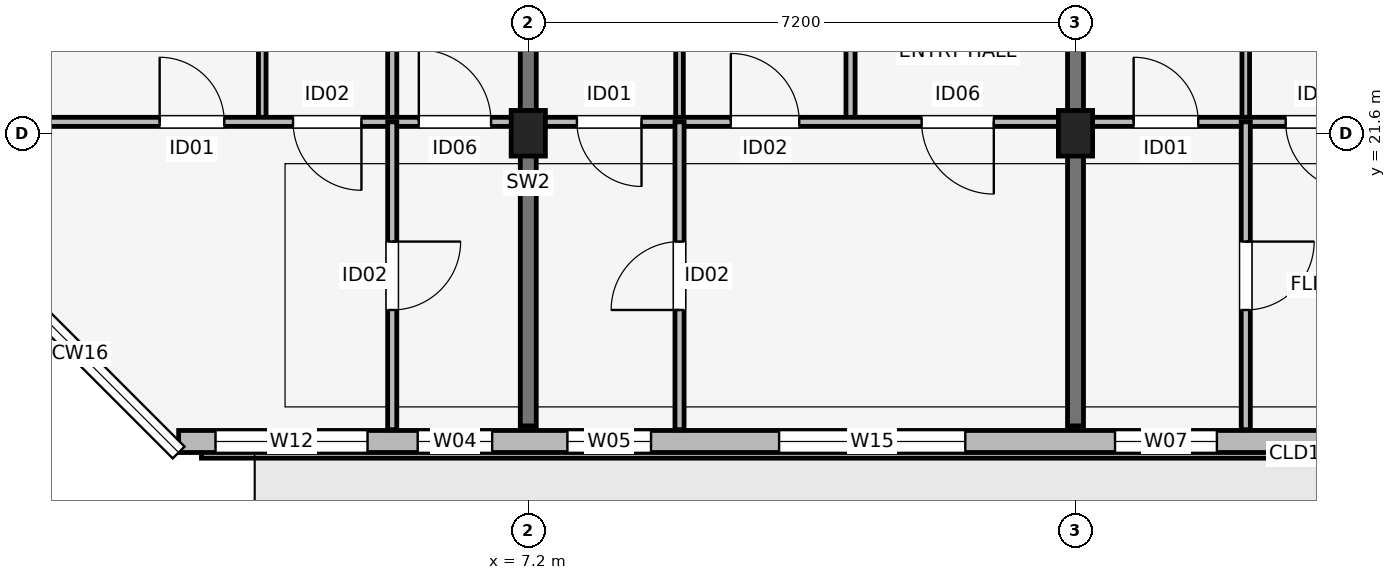
"""IFC4 building model, lengths in metres.
Left out: names, types, materials, properties, quantities, classifications, styles, units other than length and angle.
Written with IfcOpenShell. Run it as: python <this file> out.ifc"""

import sys

from ifc_helpers import new_model, si_unit, direction, frame, frame_2d, origin, origin_2d, place, context, subcontext, project, spatial, rectangle, extrude, element, fill, save


model = new_model("IFC4")
c1 = context("Model", 3, precision=1e-05, world=origin(), true_north=direction((0.0, 1.0)))
c2 = subcontext(c1, "Body", "Model", "MODEL_VIEW")
j1 = project(units=[si_unit("LENGTHUNIT", "METRE"), si_unit("PLANEANGLEUNIT", "RADIAN")], contexts=[c1])
p1 = place(None, origin())
s1 = spatial("IfcSite", under=j1, at=p1, CompositionType="ELEMENT")
p2 = place(p1, origin())
s2 = spatial("IfcBuilding", under=s1, at=p2, CompositionType="ELEMENT")
p3 = place(p2, frame((0.0, 0.0, 27.6)))
s3 = spatial("IfcBuildingStorey", under=s2, at=p3, CompositionType="ELEMENT", Elevation=27.6)
for number, where, z_axis, x_axis in (
    (1, (7.2, 21.6, 0.0), (0.0, 0.0, 1.0), (1.0, 0.0, 0.0)),
    (2, (14.4, 21.6, 0.0), (0.0, 0.0, 1.0), (1.0, 0.0, 0.0)),
):
    element("IfcColumn", number, at=place(p3, frame(where, z_axis=z_axis, x_axis=x_axis)), inside=s3, PredefinedType="COLUMN", context=c2, shape_type="SweptSolid", body=[
        extrude(rectangle(XDim=0.45, YDim=0.6, at=origin_2d()), origin(), (0.0, 0.0, 1.0), 3.15),
    ])
for number, where, z_axis, x_axis in (
    (3, (7.2, 17.75, 0.0), (0.0, 0.0, 1.0), (0.0, 1.0, 0.0)),
    (4, (14.4, 17.75, 0.0), (0.0, 0.0, 1.0), (0.0, 1.0, 0.0)),
):
    element("IfcWall", number, at=place(p3, frame(where, z_axis=z_axis, x_axis=x_axis)), inside=s3, PredefinedType="SHEAR", context=c2, shape_type="SweptSolid", body=[
        extrude(rectangle(XDim=6.4, YDim=0.21, at=frame_2d((3.2, 0.0))), origin(), (0.0, 0.0, 1.0), 3.15),
    ])
p4 = place(p3, frame((2.6, 17.545, 0.0), z_axis=(0.0, 0.0, 1.0), x_axis=(1.0, 0.0, 0.0)))
e5 = element("IfcWall", 5, at=p4, inside=s3, PredefinedType="SOLIDWALL", context=c2, shape_type="SweptSolid", body=[
    extrude(rectangle(XDim=30.8, YDim=0.29, at=frame_2d((15.4, 0.0))), origin(), (0.0, 0.0, 1.0), 2.43),
])
p5 = place(p4, frame((17.95, 0.0, 0.0), z_axis=(0.0, 0.0, 1.0), x_axis=(-1.0, 0.0, 0.0)))
e6 = element("IfcOpeningElement", 6, at=p5, cuts=e5, PredefinedType="OPENING", context=c2, shape_type="SweptSolid", body=[
    extrude(rectangle(XDim=1.9, YDim=2.2, at=frame_2d((0.95, 1.1))), frame((0.0, 0.155, 0.0), z_axis=(0.0, -1.0, 0.0), x_axis=(1.0, 0.0, 0.0)), (0.0, 0.0, 1.0), 0.31),
])
p6 = place(p4, frame((0.485, 0.0, 0.67)))
e7 = element("IfcOpeningElement", 7, at=p6, cuts=e5, PredefinedType="OPENING", context=c2, shape_type="SweptSolid", body=[
    extrude(rectangle(XDim=2.0, YDim=1.65, at=frame_2d((1.0, 0.825))), frame((0.0, 0.155, 0.0), z_axis=(0.0, -1.0, 0.0), x_axis=(1.0, 0.0, 0.0)), (0.0, 0.0, 1.0), 0.31),
])
p7 = place(p4, frame((3.145, 0.0, 0.75)))
e8 = element("IfcOpeningElement", 8, at=p7, cuts=e5, PredefinedType="OPENING", context=c2, shape_type="SweptSolid", body=[
    extrude(rectangle(XDim=0.98, YDim=1.45, at=frame_2d((0.49, 0.725))), frame((0.0, 0.155, 0.0), z_axis=(0.0, -1.0, 0.0), x_axis=(1.0, 0.0, 0.0)), (0.0, 0.0, 1.0), 0.31),
])
p8 = place(p4, frame((5.115, 0.0, 0.75)))
e9 = element("IfcOpeningElement", 9, at=p8, cuts=e5, PredefinedType="OPENING", context=c2, shape_type="SweptSolid", body=[
    extrude(rectangle(XDim=1.1, YDim=1.5, at=frame_2d((0.55, 0.75))), frame((0.0, 0.155, 0.0), z_axis=(0.0, -1.0, 0.0), x_axis=(1.0, 0.0, 0.0)), (0.0, 0.0, 1.0), 0.31),
])
p9 = place(p4, frame((7.9, 0.0, 0.67)))
e10 = element("IfcOpeningElement", 10, at=p9, cuts=e5, PredefinedType="OPENING", context=c2, shape_type="SweptSolid", body=[
    extrude(rectangle(XDim=2.45, YDim=1.65, at=frame_2d((1.225, 0.825))), frame((0.0, 0.155, 0.0), z_axis=(0.0, -1.0, 0.0), x_axis=(1.0, 0.0, 0.0)), (0.0, 0.0, 1.0), 0.31),
])
p10 = place(p4, frame((12.32, 0.0, 0.75)))
e11 = element("IfcOpeningElement", 11, at=p10, cuts=e5, PredefinedType="OPENING", context=c2, shape_type="SweptSolid", body=[
    extrude(rectangle(XDim=1.34, YDim=1.55, at=frame_2d((0.67, 0.775))), frame((0.0, 0.155, 0.0), z_axis=(0.0, -1.0, 0.0), x_axis=(1.0, 0.0, 0.0)), (0.0, 0.0, 1.0), 0.31),
])
p11 = place(p4, frame((19.46, 0.0, 0.75)))
e12 = element("IfcOpeningElement", 12, at=p11, cuts=e5, PredefinedType="OPENING", context=c2, shape_type="SweptSolid", body=[
    extrude(rectangle(XDim=1.46, YDim=1.55, at=frame_2d((0.73, 0.775))), frame((0.0, 0.155, 0.0), z_axis=(0.0, -1.0, 0.0), x_axis=(1.0, 0.0, 0.0)), (0.0, 0.0, 1.0), 0.31),
])
p12 = place(p4, frame((22.72, 0.0, 0.7)))
e13 = element("IfcOpeningElement", 13, at=p12, cuts=e5, PredefinedType="OPENING", context=c2, shape_type="SweptSolid", body=[
    extrude(rectangle(XDim=1.86, YDim=1.6, at=frame_2d((0.93, 0.8))), frame((0.0, 0.155, 0.0), z_axis=(0.0, -1.0, 0.0), x_axis=(1.0, 0.0, 0.0)), (0.0, 0.0, 1.0), 0.31),
])
p13 = place(p4, frame((27.49, 0.0, 0.67)))
e14 = element("IfcOpeningElement", 14, at=p13, cuts=e5, PredefinedType="OPENING", context=c2, shape_type="SweptSolid", body=[
    extrude(rectangle(XDim=2.0, YDim=1.65, at=frame_2d((1.0, 0.825))), frame((0.0, 0.155, 0.0), z_axis=(0.0, -1.0, 0.0), x_axis=(1.0, 0.0, 0.0)), (0.0, 0.0, 1.0), 0.31),
])
p14 = place(p3, frame((3.7, 21.75, 0.0), z_axis=(0.0, 0.0, 1.0), x_axis=(0.0, 1.0, 0.0)))
e15 = element("IfcWall", 15, at=p14, inside=s3, PredefinedType="PARTITIONING", context=c2, shape_type="SweptSolid", body=[
    extrude(rectangle(XDim=2.55, YDim=0.1, at=frame_2d((1.275, 0.0))), origin(), (0.0, 0.0, 1.0), 2.38),
])
p15 = place(p3, frame((5.41, 21.75, 0.0), z_axis=(0.0, 0.0, 1.0), x_axis=(0.0, 1.0, 0.0)))
e16 = element("IfcWall", 16, at=p15, inside=s3, PredefinedType="PARTITIONING", context=c2, shape_type="SweptSolid", body=[
    extrude(rectangle(XDim=2.55, YDim=0.12, at=frame_2d((1.275, 0.0))), origin(), (0.0, 0.0, 1.0), 2.38),
])
p16 = place(p3, frame((0.14, 21.75, 0.0), z_axis=(0.0, 0.0, 1.0), x_axis=(1.0, 0.0, 0.0)))
e17 = element("IfcWall", 17, at=p16, inside=s3, PredefinedType="PARTITIONING", context=c2, shape_type="SweptSolid", body=[
    extrude(rectangle(XDim=6.92, YDim=0.12, at=frame_2d((3.46, 0.0))), origin(), (0.0, 0.0, 1.0), 2.38),
])
p17 = place(p16, frame((2.21, 0.0, 0.0)))
e18 = element("IfcOpeningElement", 18, at=p17, cuts=e17, PredefinedType="OPENING", context=c2, shape_type="SweptSolid", body=[
    extrude(rectangle(XDim=0.85, YDim=2.08, at=frame_2d((0.425, 1.04))), frame((0.0, 0.07, 0.0), z_axis=(0.0, -1.0, 0.0), x_axis=(1.0, 0.0, 0.0)), (0.0, 0.0, 1.0), 0.14),
])
p18 = place(p16, frame((4.865, 0.0, 0.0), z_axis=(0.0, 0.0, 1.0), x_axis=(-1.0, 0.0, 0.0)))
e19 = element("IfcOpeningElement", 19, at=p18, cuts=e17, PredefinedType="OPENING", context=c2, shape_type="SweptSolid", body=[
    extrude(rectangle(XDim=0.9, YDim=2.08, at=frame_2d((0.45, 1.04))), frame((0.0, 0.07, 0.0), z_axis=(0.0, -1.0, 0.0), x_axis=(1.0, 0.0, 0.0)), (0.0, 0.0, 1.0), 0.14),
])
p19 = place(p16, frame((5.62, 0.0, 0.0)))
e20 = element("IfcOpeningElement", 20, at=p19, cuts=e17, PredefinedType="OPENING", context=c2, shape_type="SweptSolid", body=[
    extrude(rectangle(XDim=0.95, YDim=2.08, at=frame_2d((0.475, 1.04))), frame((0.0, 0.07, 0.0), z_axis=(0.0, -1.0, 0.0), x_axis=(1.0, 0.0, 0.0)), (0.0, 0.0, 1.0), 0.14),
])
p20 = place(p3, frame((5.41, 17.7, 0.0), z_axis=(0.0, 0.0, 1.0), x_axis=(0.0, 1.0, 0.0)))
e21 = element("IfcWall", 21, at=p20, inside=s3, PredefinedType="PARTITIONING", context=c2, shape_type="SweptSolid", body=[
    extrude(rectangle(XDim=4.05, YDim=0.12, at=frame_2d((2.025, 0.0))), origin(), (0.0, 0.0, 1.0), 2.38),
])
p21 = place(p20, frame((2.475, 0.0, 0.0), z_axis=(0.0, 0.0, 1.0), x_axis=(-1.0, 0.0, 0.0)))
e22 = element("IfcOpeningElement", 22, at=p21, cuts=e21, PredefinedType="OPENING", context=c2, shape_type="SweptSolid", body=[
    extrude(rectangle(XDim=0.9, YDim=2.08, at=frame_2d((0.45, 1.04))), frame((0.0, 0.07, 0.0), z_axis=(0.0, -1.0, 0.0), x_axis=(1.0, 0.0, 0.0)), (0.0, 0.0, 1.0), 0.14),
])
p22 = place(p3, frame((9.19, 21.75, 0.0), z_axis=(0.0, 0.0, 1.0), x_axis=(0.0, 1.0, 0.0)))
e23 = element("IfcWall", 23, at=p22, inside=s3, PredefinedType="PARTITIONING", context=c2, shape_type="SweptSolid", body=[
    extrude(rectangle(XDim=2.55, YDim=0.1, at=frame_2d((1.275, 0.0))), origin(), (0.0, 0.0, 1.0), 2.38),
])
p23 = place(p3, frame((11.44, 21.75, 0.0), z_axis=(0.0, 0.0, 1.0), x_axis=(0.0, 1.0, 0.0)))
e24 = element("IfcWall", 24, at=p23, inside=s3, PredefinedType="PARTITIONING", context=c2, shape_type="SweptSolid", body=[
    extrude(rectangle(XDim=2.55, YDim=0.12, at=frame_2d((1.275, 0.0))), origin(), (0.0, 0.0, 1.0), 2.38),
])
p24 = place(p3, frame((7.34, 21.75, 0.0), z_axis=(0.0, 0.0, 1.0), x_axis=(1.0, 0.0, 0.0)))
e25 = element("IfcWall", 25, at=p24, inside=s3, PredefinedType="PARTITIONING", context=c2, shape_type="SweptSolid", body=[
    extrude(rectangle(XDim=6.92, YDim=0.12, at=frame_2d((3.46, 0.0))), origin(), (0.0, 0.0, 1.0), 2.38),
])
p25 = place(p24, frame((1.35, 0.0, 0.0), z_axis=(0.0, 0.0, 1.0), x_axis=(-1.0, 0.0, 0.0)))
e26 = element("IfcOpeningElement", 26, at=p25, cuts=e25, PredefinedType="OPENING", context=c2, shape_type="SweptSolid", body=[
    extrude(rectangle(XDim=0.85, YDim=2.08, at=frame_2d((0.425, 1.04))), frame((0.0, 0.07, 0.0), z_axis=(0.0, -1.0, 0.0), x_axis=(1.0, 0.0, 0.0)), (0.0, 0.0, 1.0), 0.14),
])
p26 = place(p24, frame((2.525, 0.0, 0.0)))
e27 = element("IfcOpeningElement", 27, at=p26, cuts=e25, PredefinedType="OPENING", context=c2, shape_type="SweptSolid", body=[
    extrude(rectangle(XDim=0.9, YDim=2.08, at=frame_2d((0.45, 1.04))), frame((0.0, 0.07, 0.0), z_axis=(0.0, -1.0, 0.0), x_axis=(1.0, 0.0, 0.0)), (0.0, 0.0, 1.0), 0.14),
])
p27 = place(p24, frame((5.985, 0.0, 0.0), z_axis=(0.0, 0.0, 1.0), x_axis=(-1.0, 0.0, 0.0)))
e28 = element("IfcOpeningElement", 28, at=p27, cuts=e25, PredefinedType="OPENING", context=c2, shape_type="SweptSolid", body=[
    extrude(rectangle(XDim=0.95, YDim=2.08, at=frame_2d((0.475, 1.04))), frame((0.0, 0.07, 0.0), z_axis=(0.0, -1.0, 0.0), x_axis=(1.0, 0.0, 0.0)), (0.0, 0.0, 1.0), 0.14),
])
p28 = place(p3, frame((9.19, 17.7, 0.0), z_axis=(0.0, 0.0, 1.0), x_axis=(0.0, 1.0, 0.0)))
e29 = element("IfcWall", 29, at=p28, inside=s3, PredefinedType="PARTITIONING", context=c2, shape_type="SweptSolid", body=[
    extrude(rectangle(XDim=4.05, YDim=0.12, at=frame_2d((2.025, 0.0))), origin(), (0.0, 0.0, 1.0), 2.38),
])
p29 = place(p28, frame((1.575, 0.0, 0.0)))
e30 = element("IfcOpeningElement", 30, at=p29, cuts=e29, PredefinedType="OPENING", context=c2, shape_type="SweptSolid", body=[
    extrude(rectangle(XDim=0.9, YDim=2.08, at=frame_2d((0.45, 1.04))), frame((0.0, 0.07, 0.0), z_axis=(0.0, -1.0, 0.0), x_axis=(1.0, 0.0, 0.0)), (0.0, 0.0, 1.0), 0.14),
])
p30 = place(p3, frame((16.64, 21.75, 0.0), z_axis=(0.0, 0.0, 1.0), x_axis=(0.0, 1.0, 0.0)))
e31 = element("IfcWall", 31, at=p30, inside=s3, PredefinedType="PARTITIONING", context=c2, shape_type="SweptSolid", body=[
    extrude(rectangle(XDim=2.55, YDim=0.1, at=frame_2d((1.275, 0.0))), origin(), (0.0, 0.0, 1.0), 2.38),
])
p31 = place(p3, frame((14.54, 21.75, 0.0), z_axis=(0.0, 0.0, 1.0), x_axis=(1.0, 0.0, 0.0)))
e32 = element("IfcWall", 32, at=p31, inside=s3, PredefinedType="PARTITIONING", context=c2, shape_type="SweptSolid", body=[
    extrude(rectangle(XDim=6.92, YDim=0.12, at=frame_2d((3.46, 0.0))), origin(), (0.0, 0.0, 1.0), 2.38),
])
p32 = place(p31, frame((0.625, 0.0, 0.0)))
e33 = element("IfcOpeningElement", 33, at=p32, cuts=e32, PredefinedType="OPENING", context=c2, shape_type="SweptSolid", body=[
    extrude(rectangle(XDim=0.85, YDim=2.08, at=frame_2d((0.425, 1.04))), frame((0.0, 0.07, 0.0), z_axis=(0.0, -1.0, 0.0), x_axis=(1.0, 0.0, 0.0)), (0.0, 0.0, 1.0), 0.14),
])
p33 = place(p31, frame((3.525, 0.0, 0.0), z_axis=(0.0, 0.0, 1.0), x_axis=(-1.0, 0.0, 0.0)))
e34 = element("IfcOpeningElement", 34, at=p33, cuts=e32, PredefinedType="OPENING", context=c2, shape_type="SweptSolid", body=[
    extrude(rectangle(XDim=0.9, YDim=2.08, at=frame_2d((0.45, 1.04))), frame((0.0, 0.07, 0.0), z_axis=(0.0, -1.0, 0.0), x_axis=(1.0, 0.0, 0.0)), (0.0, 0.0, 1.0), 0.14),
])
p34 = place(p31, frame((5.01, 0.0, 0.0)))
e35 = element("IfcOpeningElement", 35, at=p34, cuts=e32, PredefinedType="OPENING", context=c2, shape_type="SweptSolid", body=[
    extrude(rectangle(XDim=0.95, YDim=2.08, at=frame_2d((0.475, 1.04))), frame((0.0, 0.07, 0.0), z_axis=(0.0, -1.0, 0.0), x_axis=(1.0, 0.0, 0.0)), (0.0, 0.0, 1.0), 0.14),
])
p35 = place(p3, frame((16.64, 17.7, 0.0), z_axis=(0.0, 0.0, 1.0), x_axis=(0.0, 1.0, 0.0)))
e36 = element("IfcWall", 36, at=p35, inside=s3, PredefinedType="PARTITIONING", context=c2, shape_type="SweptSolid", body=[
    extrude(rectangle(XDim=4.05, YDim=0.12, at=frame_2d((2.025, 0.0))), origin(), (0.0, 0.0, 1.0), 2.38),
])
p36 = place(p35, frame((2.475, 0.0, 0.0), z_axis=(0.0, 0.0, 1.0), x_axis=(-1.0, 0.0, 0.0)))
e37 = element("IfcOpeningElement", 37, at=p36, cuts=e36, PredefinedType="OPENING", context=c2, shape_type="SweptSolid", body=[
    extrude(rectangle(XDim=0.9, YDim=2.08, at=frame_2d((0.45, 1.04))), frame((0.0, 0.07, 0.0), z_axis=(0.0, -1.0, 0.0), x_axis=(1.0, 0.0, 0.0)), (0.0, 0.0, 1.0), 0.14),
])
p37 = place(p6, origin())
e38 = element("IfcWindow", 38, at=p37, inside=s3, PartitioningType="SINGLE_PANEL", PredefinedType="WINDOW", context=c2, shape_type="SweptSolid", body=[
    extrude(rectangle(XDim=2.0, YDim=1.65, at=frame_2d((1.0, 0.825))), frame((0.0, 0.03, 0.0), z_axis=(0.0, -1.0, 0.0), x_axis=(1.0, 0.0, 0.0)), (0.0, 0.0, 1.0), 0.06),
])
fill(e7, e38)
p38 = place(p7, origin())
e39 = element("IfcWindow", 39, at=p38, inside=s3, PartitioningType="SINGLE_PANEL", PredefinedType="WINDOW", context=c2, shape_type="SweptSolid", body=[
    extrude(rectangle(XDim=0.98, YDim=1.45, at=frame_2d((0.49, 0.725))), frame((0.0, 0.03, 0.0), z_axis=(0.0, -1.0, 0.0), x_axis=(1.0, 0.0, 0.0)), (0.0, 0.0, 1.0), 0.06),
])
fill(e8, e39)
p39 = place(p8, origin())
e40 = element("IfcWindow", 40, at=p39, inside=s3, PartitioningType="SINGLE_PANEL", PredefinedType="WINDOW", context=c2, shape_type="SweptSolid", body=[
    extrude(rectangle(XDim=1.1, YDim=1.5, at=frame_2d((0.55, 0.75))), frame((0.0, 0.03, 0.0), z_axis=(0.0, -1.0, 0.0), x_axis=(1.0, 0.0, 0.0)), (0.0, 0.0, 1.0), 0.06),
])
fill(e9, e40)
p40 = place(p9, origin())
e41 = element("IfcWindow", 41, at=p40, inside=s3, PartitioningType="SINGLE_PANEL", PredefinedType="WINDOW", context=c2, shape_type="SweptSolid", body=[
    extrude(rectangle(XDim=2.45, YDim=1.65, at=frame_2d((1.225, 0.825))), frame((0.0, 0.03, 0.0), z_axis=(0.0, -1.0, 0.0), x_axis=(1.0, 0.0, 0.0)), (0.0, 0.0, 1.0), 0.06),
])
fill(e10, e41)
p41 = place(p10, origin())
e42 = element("IfcWindow", 42, at=p41, inside=s3, PartitioningType="SINGLE_PANEL", PredefinedType="WINDOW", context=c2, shape_type="SweptSolid", body=[
    extrude(rectangle(XDim=1.34, YDim=1.55, at=frame_2d((0.67, 0.775))), frame((0.0, 0.03, 0.0), z_axis=(0.0, -1.0, 0.0), x_axis=(1.0, 0.0, 0.0)), (0.0, 0.0, 1.0), 0.06),
])
fill(e11, e42)
p42 = place(p17, origin())
e43 = element("IfcDoor", 43, at=p42, inside=s3, OperationType="SINGLE_SWING_LEFT", PredefinedType="DOOR", context=c2, shape_type="SweptSolid", body=[
    extrude(rectangle(XDim=0.85, YDim=2.08, at=frame_2d((0.425, 1.04))), frame((0.0, 0.025, 0.0), z_axis=(0.0, -1.0, 0.0), x_axis=(1.0, 0.0, 0.0)), (0.0, 0.0, 1.0), 0.05),
])
fill(e18, e43)
p43 = place(p18, origin())
e44 = element("IfcDoor", 44, at=p43, inside=s3, OperationType="SINGLE_SWING_RIGHT", PredefinedType="DOOR", context=c2, shape_type="SweptSolid", body=[
    extrude(rectangle(XDim=0.9, YDim=2.08, at=frame_2d((0.45, 1.04))), frame((0.0, 0.025, 0.0), z_axis=(0.0, -1.0, 0.0), x_axis=(1.0, 0.0, 0.0)), (0.0, 0.0, 1.0), 0.05),
])
fill(e19, e44)
p44 = place(p19, origin())
e45 = element("IfcDoor", 45, at=p44, inside=s3, OperationType="SINGLE_SWING_LEFT", PredefinedType="DOOR", context=c2, shape_type="SweptSolid", body=[
    extrude(rectangle(XDim=0.95, YDim=2.08, at=frame_2d((0.475, 1.04))), frame((0.0, 0.025, 0.0), z_axis=(0.0, -1.0, 0.0), x_axis=(1.0, 0.0, 0.0)), (0.0, 0.0, 1.0), 0.05),
])
fill(e20, e45)
p45 = place(p21, origin())
e46 = element("IfcDoor", 46, at=p45, inside=s3, OperationType="SINGLE_SWING_RIGHT", PredefinedType="DOOR", context=c2, shape_type="SweptSolid", body=[
    extrude(rectangle(XDim=0.9, YDim=2.08, at=frame_2d((0.45, 1.04))), frame((0.0, 0.025, 0.0), z_axis=(0.0, -1.0, 0.0), x_axis=(1.0, 0.0, 0.0)), (0.0, 0.0, 1.0), 0.05),
])
fill(e22, e46)
p46 = place(p25, origin())
e47 = element("IfcDoor", 47, at=p46, inside=s3, OperationType="SINGLE_SWING_RIGHT", PredefinedType="DOOR", context=c2, shape_type="SweptSolid", body=[
    extrude(rectangle(XDim=0.85, YDim=2.08, at=frame_2d((0.425, 1.04))), frame((0.0, 0.025, 0.0), z_axis=(0.0, -1.0, 0.0), x_axis=(1.0, 0.0, 0.0)), (0.0, 0.0, 1.0), 0.05),
])
fill(e26, e47)
p47 = place(p26, origin())
e48 = element("IfcDoor", 48, at=p47, inside=s3, OperationType="SINGLE_SWING_LEFT", PredefinedType="DOOR", context=c2, shape_type="SweptSolid", body=[
    extrude(rectangle(XDim=0.9, YDim=2.08, at=frame_2d((0.45, 1.04))), frame((0.0, 0.025, 0.0), z_axis=(0.0, -1.0, 0.0), x_axis=(1.0, 0.0, 0.0)), (0.0, 0.0, 1.0), 0.05),
])
fill(e27, e48)
p48 = place(p27, origin())
e49 = element("IfcDoor", 49, at=p48, inside=s3, OperationType="SINGLE_SWING_RIGHT", PredefinedType="DOOR", context=c2, shape_type="SweptSolid", body=[
    extrude(rectangle(XDim=0.95, YDim=2.08, at=frame_2d((0.475, 1.04))), frame((0.0, 0.025, 0.0), z_axis=(0.0, -1.0, 0.0), x_axis=(1.0, 0.0, 0.0)), (0.0, 0.0, 1.0), 0.05),
])
fill(e28, e49)
p49 = place(p29, origin())
e50 = element("IfcDoor", 50, at=p49, inside=s3, OperationType="SINGLE_SWING_LEFT", PredefinedType="DOOR", context=c2, shape_type="SweptSolid", body=[
    extrude(rectangle(XDim=0.9, YDim=2.08, at=frame_2d((0.45, 1.04))), frame((0.0, 0.025, 0.0), z_axis=(0.0, -1.0, 0.0), x_axis=(1.0, 0.0, 0.0)), (0.0, 0.0, 1.0), 0.05),
])
fill(e30, e50)
p50 = place(p32, origin())
e51 = element("IfcDoor", 51, at=p50, inside=s3, OperationType="SINGLE_SWING_LEFT", PredefinedType="DOOR", context=c2, shape_type="SweptSolid", body=[
    extrude(rectangle(XDim=0.85, YDim=2.08, at=frame_2d((0.425, 1.04))), frame((0.0, 0.025, 0.0), z_axis=(0.0, -1.0, 0.0), x_axis=(1.0, 0.0, 0.0)), (0.0, 0.0, 1.0), 0.05),
])
fill(e33, e51)
p51 = place(p33, origin())
e52 = element("IfcDoor", 52, at=p51, inside=s3, OperationType="SINGLE_SWING_RIGHT", PredefinedType="DOOR", context=c2, shape_type="SweptSolid", body=[
    extrude(rectangle(XDim=0.9, YDim=2.08, at=frame_2d((0.45, 1.04))), frame((0.0, 0.025, 0.0), z_axis=(0.0, -1.0, 0.0), x_axis=(1.0, 0.0, 0.0)), (0.0, 0.0, 1.0), 0.05),
])
fill(e34, e52)
p52 = place(p36, origin())
e53 = element("IfcDoor", 53, at=p52, inside=s3, OperationType="SINGLE_SWING_RIGHT", PredefinedType="DOOR", context=c2, shape_type="SweptSolid", body=[
    extrude(rectangle(XDim=0.9, YDim=2.08, at=frame_2d((0.45, 1.04))), frame((0.0, 0.025, 0.0), z_axis=(0.0, -1.0, 0.0), x_axis=(1.0, 0.0, 0.0)), (0.0, 0.0, 1.0), 0.05),
])
fill(e37, e53)
save(model, sys.argv[1])
